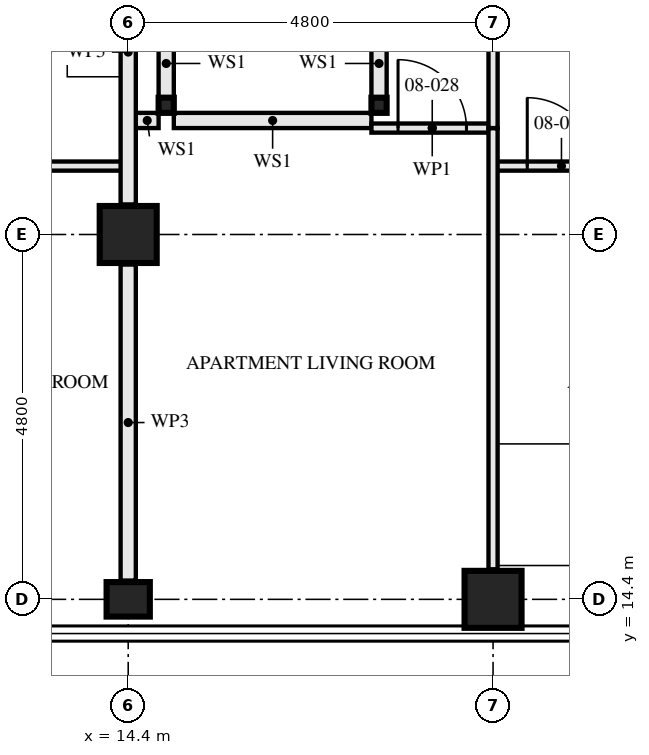
"""IFC4 building model, lengths in metres.
Left out: names, types, materials, properties, quantities, classifications, styles, units other than length and angle.
Written with IfcOpenShell. Run it as: python <this file> out.ifc"""

import sys

from ifc_helpers import new_model, si_unit, direction, frame, frame_2d, origin, origin_2d, place, context, subcontext, project, spatial, rectangle, hollow_rectangle, i_section, extrude, element, fill, save


model = new_model("IFC4")
c1 = context("Model", 3, precision=1e-05, world=origin(), true_north=direction((0.0, 1.0)))
c2 = subcontext(c1, "Body", "Model", "MODEL_VIEW")
j1 = project(units=[si_unit("LENGTHUNIT", "METRE"), si_unit("PLANEANGLEUNIT", "RADIAN")], contexts=[c1])
p1 = place(None, origin())
s1 = spatial("IfcSite", under=j1, at=p1, CompositionType="ELEMENT")
p2 = place(p1, origin())
s2 = spatial("IfcBuilding", under=s1, at=p2, CompositionType="ELEMENT")
p3 = place(p2, frame((0.0, 0.0, 34.0)))
s3 = spatial("IfcBuildingStorey", under=s2, at=p3, CompositionType="ELEMENT", Elevation=34.0)
p4 = place(p3, frame((14.4, 14.4, 0.0), z_axis=(0.0, 0.0, 1.0), x_axis=(0.0, 1.0, 0.0)))
e1 = element("IfcColumn", 1, at=p4, inside=s3, PredefinedType="COLUMN", context=c2, shape_type="SweptSolid", body=[
    extrude(i_section(OverallWidth=0.454, OverallDepth=0.569, WebThickness=0.078, FlangeThickness=0.125, FilletRadius=0.015, at=origin_2d()), origin(), (0.0, 0.0, 1.0), 3.5),
])
for number, where, z_axis, x_axis in (
    (2, (14.4, 19.2, 0.0), (0.0, 0.0, 1.0), (1.0, 0.0, 0.0)),
    (3, (19.2, 14.4, 0.0), (0.0, 0.0, 1.0), (0.0, 1.0, 0.0)),
):
    element("IfcColumn", number, at=place(p3, frame(where, z_axis=z_axis, x_axis=x_axis)), inside=s3, PredefinedType="COLUMN", context=c2, shape_type="SweptSolid", body=[
        extrude(hollow_rectangle(XDim=0.75, YDim=0.75, WallThickness=0.08, at=origin_2d()), origin(), (0.0, 0.0, 1.0), 3.5),
    ])
for number, where, z_axis, x_axis in (
    (4, (14.9, 20.9, 0.0), (0.0, 0.0, 1.0), (1.0, 0.0, 0.0)),
    (5, (17.7, 20.9, 0.0), (0.0, 0.0, 1.0), (1.0, 0.0, 0.0)),
):
    element("IfcColumn", number, at=place(p3, frame(where, z_axis=z_axis, x_axis=x_axis)), inside=s3, PredefinedType="COLUMN", context=c2, shape_type="SweptSolid", body=[
        extrude(hollow_rectangle(XDim=0.2, YDim=0.2, WallThickness=0.008, at=origin_2d()), origin(), (0.0, 0.0, 1.0), 3.33),
    ])
p5 = place(p3, frame((9.6, 20.1, 0.0), z_axis=(0.0, 0.0, 1.0), x_axis=(1.0, 0.0, 0.0)))
e6 = element("IfcWall", 6, at=p5, inside=s3, PredefinedType="PARTITIONING", context=c2, shape_type="SweptSolid", body=[
    extrude(rectangle(XDim=4.8, YDim=0.12, at=frame_2d((2.4, 0.0))), origin(), (0.0, 0.0, 1.0), 3.33),
])
p6 = place(p5, frame((0.45, 0.0, 0.0)))
e7 = element("IfcOpeningElement", 7, at=p6, cuts=e6, PredefinedType="OPENING", context=c2, shape_type="SweptSolid", body=[
    extrude(rectangle(XDim=0.9, YDim=2.1, at=frame_2d((0.45, 1.05))), frame((0.0, 0.071, 0.0), z_axis=(0.0, -1.0, 0.0), x_axis=(1.0, 0.0, 0.0)), (0.0, 0.0, 1.0), 0.141),
])
for number, where, z_axis, x_axis in (
    (8, (14.9, 21.0, 0.0), (0.0, 0.0, 1.0), (0.0, 1.0, 0.0)),
    (9, (17.7, 21.0, 0.0), (0.0, 0.0, 1.0), (0.0, 1.0, 0.0)),
):
    element("IfcWall", number, at=place(p3, frame(where, z_axis=z_axis, x_axis=x_axis)), inside=s3, PredefinedType="SOLIDWALL", context=c2, shape_type="SweptSolid", body=[
        extrude(rectangle(XDim=0.9, YDim=0.2, at=frame_2d((0.45, 0.0))), origin(), (0.0, 0.0, 1.0), 2.99),
    ])
p7 = place(p3, frame((14.5, 20.7, 0.0), z_axis=(0.0, 0.0, 1.0), x_axis=(1.0, 0.0, 0.0)))
e10 = element("IfcWall", 10, at=p7, inside=s3, PredefinedType="SOLIDWALL", context=c2, shape_type="SweptSolid", body=[
    extrude(rectangle(XDim=0.3, YDim=0.2, at=frame_2d((0.15, 0.0))), origin(), (0.0, 0.0, 1.0), 3.33),
])
p8 = place(p3, frame((15.0, 20.7, 0.0), z_axis=(0.0, 0.0, 1.0), x_axis=(1.0, 0.0, 0.0)))
e11 = element("IfcWall", 11, at=p8, inside=s3, PredefinedType="SOLIDWALL", context=c2, shape_type="SweptSolid", body=[
    extrude(rectangle(XDim=2.6, YDim=0.2, at=frame_2d((1.3, 0.0))), origin(), (0.0, 0.0, 1.0), 3.33),
])
p9 = place(p3, frame((19.2, 20.6, 0.0), z_axis=(0.0, 0.0, 1.0), x_axis=(0.0, 1.0, 0.0)))
e12 = element("IfcWall", 12, at=p9, inside=s3, PredefinedType="PARTITIONING", context=c2, shape_type="SweptSolid", body=[
    extrude(rectangle(XDim=6.25, YDim=0.12, at=frame_2d((3.125, 0.0))), origin(), (0.0, 0.0, 1.0), 2.55),
])
p10 = place(p9, frame((2.675, 0.0, 0.0)))
e13 = element("IfcOpeningElement", 13, at=p10, cuts=e12, PredefinedType="OPENING", context=c2, shape_type="SweptSolid", body=[
    extrude(rectangle(XDim=0.9, YDim=2.1, at=frame_2d((0.45, 1.05))), frame((0.0, 0.071, 0.0), z_axis=(0.0, -1.0, 0.0), x_axis=(1.0, 0.0, 0.0)), (0.0, 0.0, 1.0), 0.141),
])
p11 = place(p3, frame((17.6, 20.6, 0.0), z_axis=(0.0, 0.0, 1.0), x_axis=(1.0, 0.0, 0.0)))
e14 = element("IfcWall", 14, at=p11, inside=s3, PredefinedType="PARTITIONING", context=c2, shape_type="SweptSolid", body=[
    extrude(rectangle(XDim=1.6, YDim=0.12, at=frame_2d((0.8, 0.0))), origin(), (0.0, 0.0, 1.0), 3.33),
])
p12 = place(p11, frame((0.35, 0.0, 0.0)))
e15 = element("IfcOpeningElement", 15, at=p12, cuts=e14, PredefinedType="OPENING", context=c2, shape_type="SweptSolid", body=[
    extrude(rectangle(XDim=0.9, YDim=2.1, at=frame_2d((0.45, 1.05))), frame((0.0, 0.071, 0.0), z_axis=(0.0, -1.0, 0.0), x_axis=(1.0, 0.0, 0.0)), (0.0, 0.0, 1.0), 0.141),
])
p13 = place(p3, frame((19.2, 20.1, 0.0), z_axis=(0.0, 0.0, 1.0), x_axis=(1.0, 0.0, 0.0)))
e16 = element("IfcWall", 16, at=p13, inside=s3, PredefinedType="PARTITIONING", context=c2, shape_type="SweptSolid", body=[
    extrude(rectangle(XDim=4.8, YDim=0.12, at=frame_2d((2.4, 0.0))), origin(), (0.0, 0.0, 1.0), 3.33),
])
p14 = place(p13, frame((0.45, 0.0, 0.0)))
e17 = element("IfcOpeningElement", 17, at=p14, cuts=e16, PredefinedType="OPENING", context=c2, shape_type="SweptSolid", body=[
    extrude(rectangle(XDim=0.9, YDim=2.1, at=frame_2d((0.45, 1.05))), frame((0.0, 0.071, 0.0), z_axis=(0.0, -1.0, 0.0), x_axis=(1.0, 0.0, 0.0)), (0.0, 0.0, 1.0), 0.141),
])
p15 = place(p3, frame((19.2, 14.795, 0.0), z_axis=(0.0, 0.0, 1.0), x_axis=(0.0, 1.0, 0.0)))
e18 = element("IfcWall", 18, at=p15, inside=s3, PredefinedType="PARTITIONING", context=c2, shape_type="SweptSolid", body=[
    extrude(rectangle(XDim=5.805, YDim=0.12, at=frame_2d((2.903, 0.0))), origin(), (0.0, 0.0, 1.0), 2.55),
])
p16 = place(p3, frame((14.4, 14.647, 0.0), z_axis=(0.0, 0.0, 1.0), x_axis=(0.0, 1.0, 0.0)))
e19 = element("IfcWall", 19, at=p16, inside=s3, PredefinedType="PARTITIONING", context=c2, shape_type="SweptSolid", body=[
    extrude(rectangle(XDim=4.158, YDim=0.2, at=frame_2d((2.079, 0.0))), origin(), (0.0, 0.0, 1.0), 2.32),
])
p17 = place(p3, frame((14.4, 19.595, 0.0), z_axis=(0.0, 0.0, 1.0), x_axis=(0.0, 1.0, 0.0)))
e20 = element("IfcWall", 20, at=p17, inside=s3, PredefinedType="PARTITIONING", context=c2, shape_type="SweptSolid", body=[
    extrude(rectangle(XDim=4.01, YDim=0.2, at=frame_2d((2.005, 0.0))), origin(), (0.0, 0.0, 1.0), 2.32),
])
p18 = place(p12, origin())
e21 = element("IfcDoor", 21, at=p18, inside=s3, OperationType="SINGLE_SWING_RIGHT", PredefinedType="DOOR", context=c2, shape_type="SweptSolid", body=[
    extrude(rectangle(XDim=0.9, YDim=2.1, at=frame_2d((0.45, 1.05))), frame((0.0, 0.022, 0.0), z_axis=(0.0, -1.0, 0.0), x_axis=(1.0, 0.0, 0.0)), (0.0, 0.0, 1.0), 0.044),
])
fill(e15, e21)
p19 = place(p14, origin())
e22 = element("IfcDoor", 22, at=p19, inside=s3, OperationType="SINGLE_SWING_RIGHT", PredefinedType="DOOR", context=c2, shape_type="SweptSolid", body=[
    extrude(rectangle(XDim=0.9, YDim=2.1, at=frame_2d((0.45, 1.05))), frame((0.0, 0.022, 0.0), z_axis=(0.0, -1.0, 0.0), x_axis=(1.0, 0.0, 0.0)), (0.0, 0.0, 1.0), 0.044),
])
fill(e17, e22)
save(model, sys.argv[1])
